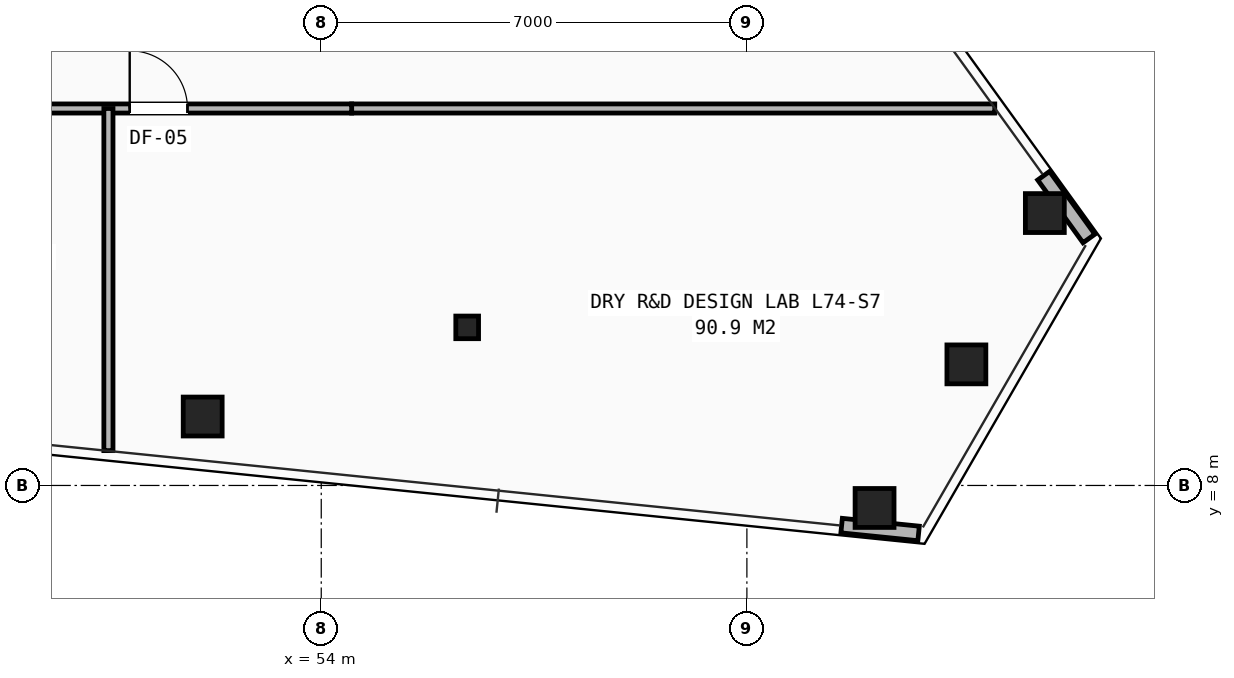
"""IFC4 building model, lengths in metres.
Left out: names, types, materials, properties, quantities, classifications, styles, units other than length and angle.
Written with IfcOpenShell. Run it as: python <this file> out.ifc"""

import sys

from ifc_helpers import new_model, si_unit, direction, frame, frame_2d, origin, origin_2d, place, context, subcontext, project, spatial, rectangle, hollow_rectangle, i_section, extrude, element, fill, save


model = new_model("IFC4")
c1 = context("Model", 3, precision=1e-05, world=origin(), true_north=direction((0.0, 1.0)))
c2 = subcontext(c1, "Body", "Model", "MODEL_VIEW")
j1 = project(units=[si_unit("LENGTHUNIT", "METRE"), si_unit("PLANEANGLEUNIT", "RADIAN")], contexts=[c1])
p1 = place(None, origin())
s1 = spatial("IfcSite", under=j1, at=p1, CompositionType="ELEMENT")
p2 = place(p1, origin())
s2 = spatial("IfcBuilding", under=s1, at=p2, CompositionType="ELEMENT")
p3 = place(p2, frame((0.0, 0.0, 262.0)))
s3 = spatial("IfcBuildingStorey", under=s2, at=p3, CompositionType="ELEMENT", Elevation=262.0)
p4 = place(p3, frame((56.4, 10.6, 0.0), z_axis=(0.0, 0.0, 1.0), x_axis=(1.0, 0.0, 0.0)))
e1 = element("IfcColumn", 1, at=p4, inside=s3, PredefinedType="COLUMN", context=c2, shape_type="SweptSolid", body=[
    extrude(i_section(OverallWidth=0.374, OverallDepth=0.372, WebThickness=0.016, FlangeThickness=0.026, at=origin_2d()), origin(), (0.0, 0.0, 1.0), 3.5),
])
for number, where, z_axis, x_axis in (
    (2, (52.05, 9.134, 0.0), (0.0, 0.0, 1.0), (1.0, 0.0, 0.0)),
    (3, (63.1, 7.63, 0.0), (0.0, 0.0, 1.0), (1.0, 0.0, 0.0)),
    (4, (64.61, 9.991, 0.0), (0.0, 0.0, 1.0), (1.0, 0.0, 0.0)),
    (5, (65.9, 12.48, 0.0), (0.0, 0.0, 1.0), (1.0, 0.0, 0.0)),
):
    element("IfcColumn", number, at=place(p3, frame(where, z_axis=z_axis, x_axis=x_axis)), inside=s3, PredefinedType="COLUMN", context=c2, shape_type="SweptSolid", body=[
        extrude(hollow_rectangle(XDim=0.64, YDim=0.64, WallThickness=0.045, at=origin_2d()), origin(), (0.0, 0.0, 1.0), 3.5),
    ])
p5 = place(p3, frame((62.558, 7.34, 0.0), z_axis=(0.0, 0.0, 1.0), x_axis=(0.994855080115, -0.10130828974, 0.0)))
e6 = element("IfcWall", 6, at=p5, inside=s3, PredefinedType="SHEAR", context=c2, shape_type="SweptSolid", body=[
    extrude(rectangle(XDim=1.272, YDim=0.24, at=frame_2d((0.636, 0.0))), origin(), (0.0, 0.0, 1.0), 2.623),
])
p6 = place(p3, frame((66.625, 12.062, 0.0), z_axis=(0.0, 0.0, 1.0), x_axis=(-0.585112505524, 0.810952129216, 0.0)))
e7 = element("IfcWall", 7, at=p6, inside=s3, PredefinedType="SHEAR", context=c2, shape_type="SweptSolid", body=[
    extrude(rectangle(XDim=1.273, YDim=0.24, at=frame_2d((0.637, 0.0))), origin(), (0.0, 0.0, 1.0), 2.623),
])
p7 = place(p3, frame((54.5, 14.2, 0.0), z_axis=(0.0, 0.0, 1.0), x_axis=(1.0, 0.0, 0.0)))
e8 = element("IfcWall", 8, at=p7, inside=s3, PredefinedType="PARTITIONING", context=c2, shape_type="SweptSolid", body=[
    extrude(rectangle(XDim=10.576, YDim=0.15, at=frame_2d((5.288, 0.0))), origin(), (0.0, 0.0, 1.0), 2.265),
])
p8 = place(p3, frame((25.5, 14.2, 0.0), z_axis=(0.0, 0.0, 1.0), x_axis=(1.0, 0.0, 0.0)))
e9 = element("IfcWall", 9, at=p8, inside=s3, PredefinedType="PARTITIONING", context=c2, shape_type="SweptSolid", body=[
    extrude(rectangle(XDim=29.0, YDim=0.15, at=frame_2d((14.5, 0.0))), origin(), (0.0, 0.0, 1.0), 2.265),
])
p9 = place(p8, frame((0.85, 0.0, 0.0)))
e10 = element("IfcOpeningElement", 10, at=p9, cuts=e9, PredefinedType="OPENING", context=c2, shape_type="SweptSolid", body=[
    extrude(rectangle(XDim=0.95, YDim=2.1, at=frame_2d((0.475, 1.05))), frame((0.0, 0.085, 0.0), z_axis=(0.0, -1.0, 0.0), x_axis=(1.0, 0.0, 0.0)), (0.0, 0.0, 1.0), 0.17),
])
p10 = place(p8, frame((4.35, 0.0, 0.0)))
e11 = element("IfcOpeningElement", 11, at=p10, cuts=e9, PredefinedType="OPENING", context=c2, shape_type="SweptSolid", body=[
    extrude(rectangle(XDim=0.95, YDim=2.1, at=frame_2d((0.475, 1.05))), frame((0.0, 0.085, 0.0), z_axis=(0.0, -1.0, 0.0), x_axis=(1.0, 0.0, 0.0)), (0.0, 0.0, 1.0), 0.17),
])
p11 = place(p8, frame((8.85, 0.0, 0.0)))
e12 = element("IfcOpeningElement", 12, at=p11, cuts=e9, PredefinedType="OPENING", context=c2, shape_type="SweptSolid", body=[
    extrude(rectangle(XDim=0.95, YDim=2.1, at=frame_2d((0.475, 1.05))), frame((0.0, 0.085, 0.0), z_axis=(0.0, -1.0, 0.0), x_axis=(1.0, 0.0, 0.0)), (0.0, 0.0, 1.0), 0.17),
])
p12 = place(p8, frame((12.85, 0.0, 0.0)))
e13 = element("IfcOpeningElement", 13, at=p12, cuts=e9, PredefinedType="OPENING", context=c2, shape_type="SweptSolid", body=[
    extrude(rectangle(XDim=0.95, YDim=2.1, at=frame_2d((0.475, 1.05))), frame((0.0, 0.085, 0.0), z_axis=(0.0, -1.0, 0.0), x_axis=(1.0, 0.0, 0.0)), (0.0, 0.0, 1.0), 0.17),
])
p13 = place(p8, frame((16.85, 0.0, 0.0)))
e14 = element("IfcOpeningElement", 14, at=p13, cuts=e9, PredefinedType="OPENING", context=c2, shape_type="SweptSolid", body=[
    extrude(rectangle(XDim=0.95, YDim=2.1, at=frame_2d((0.475, 1.05))), frame((0.0, 0.085, 0.0), z_axis=(0.0, -1.0, 0.0), x_axis=(1.0, 0.0, 0.0)), (0.0, 0.0, 1.0), 0.17),
])
p14 = place(p8, frame((20.85, 0.0, 0.0)))
e15 = element("IfcOpeningElement", 15, at=p14, cuts=e9, PredefinedType="OPENING", context=c2, shape_type="SweptSolid", body=[
    extrude(rectangle(XDim=0.95, YDim=2.1, at=frame_2d((0.475, 1.05))), frame((0.0, 0.085, 0.0), z_axis=(0.0, -1.0, 0.0), x_axis=(1.0, 0.0, 0.0)), (0.0, 0.0, 1.0), 0.17),
])
p15 = place(p8, frame((25.35, 0.0, 0.0)))
e16 = element("IfcOpeningElement", 16, at=p15, cuts=e9, PredefinedType="OPENING", context=c2, shape_type="SweptSolid", body=[
    extrude(rectangle(XDim=0.95, YDim=2.1, at=frame_2d((0.475, 1.05))), frame((0.0, 0.085, 0.0), z_axis=(0.0, -1.0, 0.0), x_axis=(1.0, 0.0, 0.0)), (0.0, 0.0, 1.0), 0.17),
])
p16 = place(p3, frame((50.5, 8.573, 0.0), z_axis=(0.0, 0.0, 1.0), x_axis=(0.0, 1.0, 0.0)))
e17 = element("IfcWall", 17, at=p16, inside=s3, PredefinedType="PARTITIONING", context=c2, shape_type="SweptSolid", body=[
    extrude(rectangle(XDim=5.627, YDim=0.15, at=frame_2d((2.813, 0.0))), origin(), (0.0, 0.0, 1.0), 2.628),
])
p17 = place(p15, origin())
e18 = element("IfcDoor", 18, at=p17, inside=s3, OperationType="SINGLE_SWING_LEFT", PredefinedType="DOOR", context=c2, shape_type="SweptSolid", body=[
    extrude(rectangle(XDim=0.95, YDim=2.1, at=frame_2d((0.475, 1.05))), frame((0.0, 0.025, 0.0), z_axis=(0.0, -1.0, 0.0), x_axis=(1.0, 0.0, 0.0)), (0.0, 0.0, 1.0), 0.05),
])
fill(e16, e18)
save(model, sys.argv[1])
